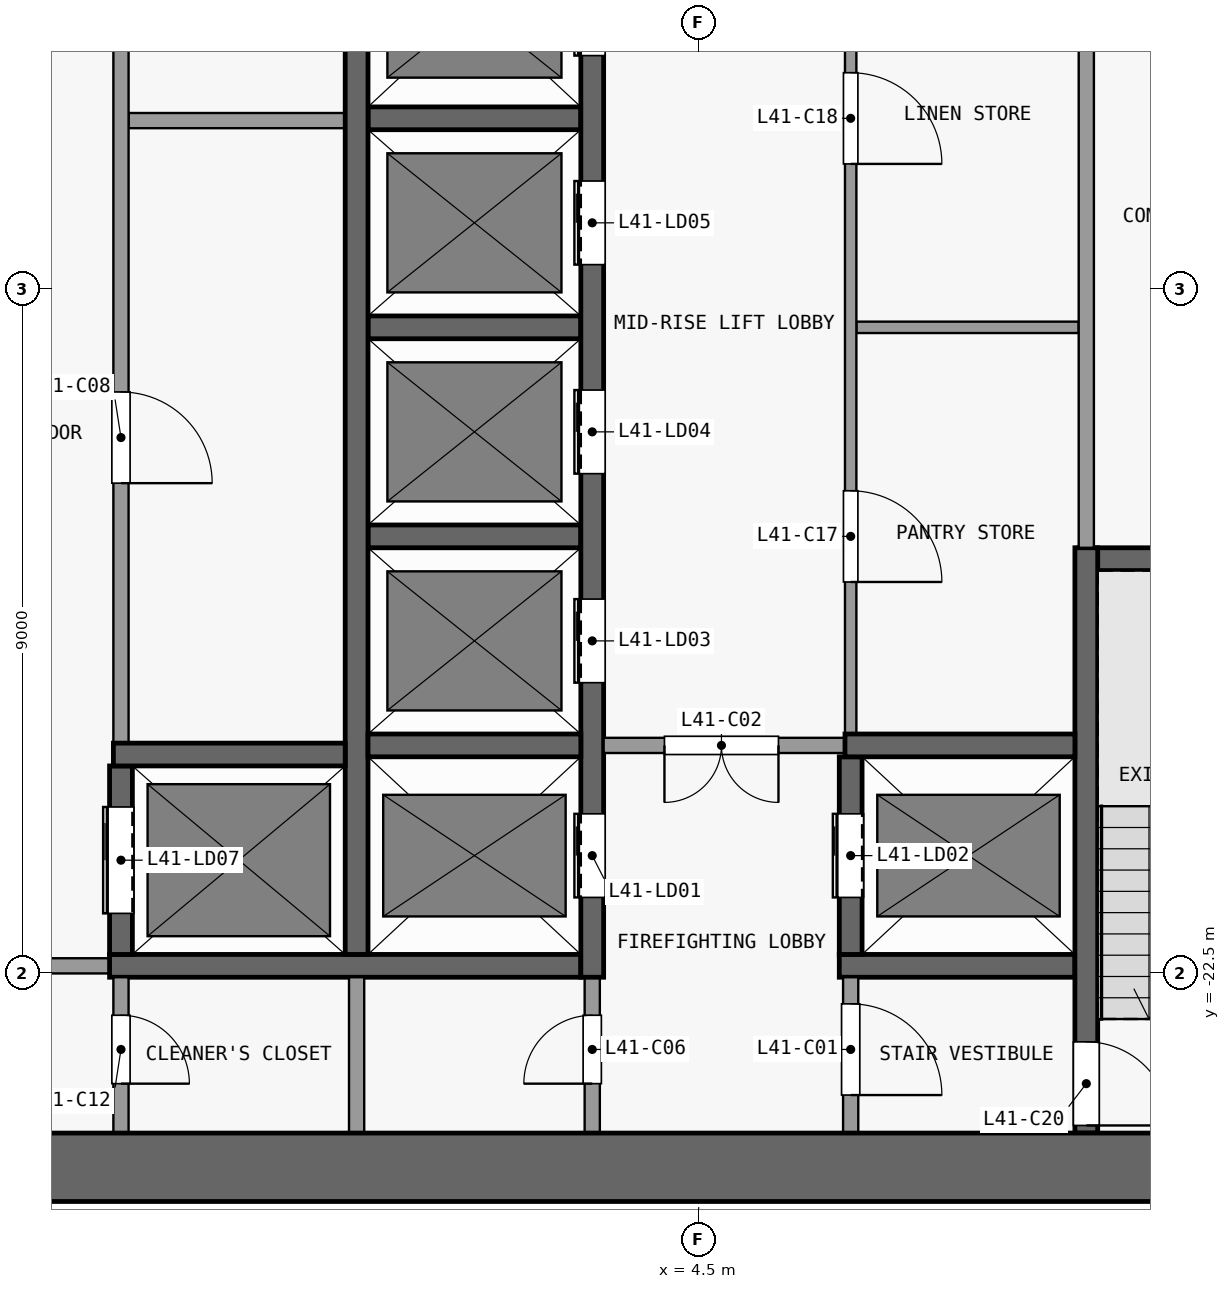
"""IFC4 building model, lengths in metres.
Left out: names, types, materials, properties, quantities, classifications, styles, units other than length and angle.
Written with IfcOpenShell. Run it as: python <this file> out.ifc"""

import sys

from ifc_helpers import new_model, si_unit, direction, frame, frame_2d, origin, place, context, subcontext, project, spatial, rectangle, extrude, element, fill, save


model = new_model("IFC4")
c1 = context("Model", 3, precision=1e-05, world=origin(), true_north=direction((0.0, 1.0)))
c2 = subcontext(c1, "Body", "Model", "MODEL_VIEW")
j1 = project(units=[si_unit("LENGTHUNIT", "METRE"), si_unit("PLANEANGLEUNIT", "RADIAN")], contexts=[c1])
p1 = place(None, origin())
s1 = spatial("IfcSite", under=j1, at=p1, CompositionType="ELEMENT")
p2 = place(p1, origin())
s2 = spatial("IfcBuilding", under=s1, at=p2, CompositionType="ELEMENT")
p3 = place(p2, frame((0.0, 0.0, 167.3)))
s3 = spatial("IfcBuildingStorey", under=s2, at=p3, CompositionType="ELEMENT", Elevation=167.3)
p4 = place(p3, frame((-13.3, -25.05, 0.0), z_axis=(0.0, 0.0, 1.0), x_axis=(1.0, 0.0, 0.0)))
e1 = element("IfcWall", 1, at=p4, inside=s3, PredefinedType="SHEAR", context=c2, shape_type="SweptSolid", body=[
    extrude(rectangle(XDim=26.6, YDim=0.9, at=frame_2d((13.3, 0.0))), origin(), (0.0, 0.0, 1.0), 3.3),
])
p5 = place(p3, frame((-3.25, -22.4, 0.0), z_axis=(0.0, 0.0, 1.0), x_axis=(-1.0, 0.0, 0.0)))
e2 = element("IfcWall", 2, at=p5, inside=s3, PredefinedType="PARTITIONING", context=c2, shape_type="SweptSolid", body=[
    extrude(rectangle(XDim=6.2, YDim=0.2, at=frame_2d((3.1, 0.0))), origin(), (0.0, 0.0, 1.0), 3.3),
])
p6 = place(p5, frame((0.8, 0.0, 0.0)))
e3 = element("IfcOpeningElement", 3, at=p6, cuts=e2, PredefinedType="OPENING", context=c2, shape_type="SweptSolid", body=[
    extrude(rectangle(XDim=1.5, YDim=2.1, at=frame_2d((0.75, 1.05))), frame((0.0, 0.11, 0.0), z_axis=(0.0, -1.0, 0.0), x_axis=(1.0, 0.0, 0.0)), (0.0, 0.0, 1.0), 0.22),
])
p7 = place(p3, frame((-3.25, -22.4, 0.0), z_axis=(0.0, 0.0, 1.0), x_axis=(1.0, 0.0, 0.0)))
e4 = element("IfcWall", 4, at=p7, inside=s3, PredefinedType="SHEAR", context=c2, shape_type="SweptSolid", body=[
    extrude(rectangle(XDim=6.2, YDim=0.3, at=frame_2d((3.1, 0.0))), origin(), (0.0, 0.0, 1.0), 3.3),
])
p8 = place(p3, frame((6.35, -22.4, 0.0), z_axis=(0.0, 0.0, 1.0), x_axis=(1.0, 0.0, 0.0)))
e5 = element("IfcWall", 5, at=p8, inside=s3, PredefinedType="SHEAR", context=c2, shape_type="SweptSolid", body=[
    extrude(rectangle(XDim=3.1, YDim=0.3, at=frame_2d((1.55, 0.0))), origin(), (0.0, 0.0, 1.0), 3.3),
])
p9 = place(p3, frame((-3.2, -19.62, 0.0), z_axis=(0.0, 0.0, 1.0), x_axis=(1.0, 0.0, 0.0)))
e6 = element("IfcWall", 6, at=p9, inside=s3, PredefinedType="SHEAR", context=c2, shape_type="SweptSolid", body=[
    extrude(rectangle(XDim=3.05, YDim=0.3, at=frame_2d((1.525, 0.0))), origin(), (0.0, 0.0, 1.0), 3.3),
])
p10 = place(p3, frame((0.15, -19.5, 0.0), z_axis=(0.0, 0.0, 1.0), x_axis=(1.0, 0.0, 0.0)))
e7 = element("IfcWall", 7, at=p10, inside=s3, PredefinedType="SHEAR", context=c2, shape_type="SweptSolid", body=[
    extrude(rectangle(XDim=2.8, YDim=0.3, at=frame_2d((1.4, 0.0))), origin(), (0.0, 0.0, 1.0), 3.3),
])
p11 = place(p3, frame((6.575, -19.5, 0.0), z_axis=(0.0, 0.0, 1.0), x_axis=(-1.0, 0.0, 0.0)))
e8 = element("IfcWall", 8, at=p11, inside=s3, PredefinedType="PARTITIONING", context=c2, shape_type="SweptSolid", body=[
    extrude(rectangle(XDim=3.325, YDim=0.2, at=frame_2d((1.663, 0.0))), origin(), (0.0, 0.0, 1.0), 3.3),
])
p12 = place(p11, frame((1.025, 0.0, 0.0)))
e9 = element("IfcOpeningElement", 9, at=p12, cuts=e8, PredefinedType="OPENING", context=c2, shape_type="SweptSolid", body=[
    extrude(rectangle(XDim=1.5, YDim=2.1, at=frame_2d((0.75, 1.05))), frame((0.0, 0.11, 0.0), z_axis=(0.0, -1.0, 0.0), x_axis=(1.0, 0.0, 0.0)), (0.0, 0.0, 1.0), 0.22),
])
p13 = place(p3, frame((6.425, -19.5, 0.0), z_axis=(0.0, 0.0, 1.0), x_axis=(1.0, 0.0, 0.0)))
e10 = element("IfcWall", 10, at=p13, inside=s3, PredefinedType="SHEAR", context=c2, shape_type="SweptSolid", body=[
    extrude(rectangle(XDim=3.025, YDim=0.3, at=frame_2d((1.512, 0.0))), origin(), (0.0, 0.0, 1.0), 3.3),
])
p14 = place(p3, frame((9.5, -17.05, 0.0), z_axis=(0.0, 0.0, 1.0), x_axis=(1.0, 0.0, 0.0)))
e11 = element("IfcWall", 11, at=p14, inside=s3, PredefinedType="SHEAR", context=c2, shape_type="SweptSolid", body=[
    extrude(rectangle(XDim=3.1, YDim=0.3, at=frame_2d((1.55, 0.0))), origin(), (0.0, 0.0, 1.0), 3.3),
])
for number, where, z_axis, x_axis in (
    (12, (0.15, -16.75, 0.0), (0.0, 0.0, 1.0), (1.0, 0.0, 0.0)),
    (13, (0.15, -14.0, 0.0), (0.0, 0.0, 1.0), (1.0, 0.0, 0.0)),
):
    element("IfcWall", number, at=place(p3, frame(where, z_axis=z_axis, x_axis=x_axis)), inside=s3, PredefinedType="SHEAR", context=c2, shape_type="SweptSolid", body=[
        extrude(rectangle(XDim=2.8, YDim=0.3, at=frame_2d((1.4, 0.0))), origin(), (0.0, 0.0, 1.0), 3.3),
    ])
p15 = place(p3, frame((6.575, -14.0, 0.0), z_axis=(0.0, 0.0, 1.0), x_axis=(1.0, 0.0, 0.0)))
e14 = element("IfcWall", 14, at=p15, inside=s3, PredefinedType="PARTITIONING", context=c2, shape_type="SweptSolid", body=[
    extrude(rectangle(XDim=2.925, YDim=0.15, at=frame_2d((1.462, 0.0))), origin(), (0.0, 0.0, 1.0), 3.3),
])
p16 = place(p3, frame((-3.0, -11.28, 0.0), z_axis=(0.0, 0.0, 1.0), x_axis=(1.0, 0.0, 0.0)))
e15 = element("IfcWall", 15, at=p16, inside=s3, PredefinedType="PARTITIONING", context=c2, shape_type="SweptSolid", body=[
    extrude(rectangle(XDim=2.85, YDim=0.2, at=frame_2d((1.425, 0.0))), origin(), (0.0, 0.0, 1.0), 3.3),
])
p17 = place(p3, frame((0.15, -11.25, 0.0), z_axis=(0.0, 0.0, 1.0), x_axis=(1.0, 0.0, 0.0)))
e16 = element("IfcWall", 16, at=p17, inside=s3, PredefinedType="SHEAR", context=c2, shape_type="SweptSolid", body=[
    extrude(rectangle(XDim=2.8, YDim=0.3, at=frame_2d((1.4, 0.0))), origin(), (0.0, 0.0, 1.0), 3.3),
])
p18 = place(p3, frame((-3.1, -22.55, 0.0), z_axis=(0.0, 0.0, 1.0), x_axis=(0.0, -1.0, 0.0)))
e17 = element("IfcWall", 17, at=p18, inside=s3, PredefinedType="PARTITIONING", context=c2, shape_type="SweptSolid", body=[
    extrude(rectangle(XDim=2.05, YDim=0.2, at=frame_2d((1.025, 0.0))), origin(), (0.0, 0.0, 1.0), 3.3),
])
p19 = place(p18, frame((0.5, 0.0, 0.0)))
e18 = element("IfcOpeningElement", 18, at=p19, cuts=e17, PredefinedType="OPENING", context=c2, shape_type="SweptSolid", body=[
    extrude(rectangle(XDim=0.9, YDim=2.1, at=frame_2d((0.45, 1.05))), frame((0.0, 0.11, 0.0), z_axis=(0.0, -1.0, 0.0), x_axis=(1.0, 0.0, 0.0)), (0.0, 0.0, 1.0), 0.22),
])
p20 = place(p3, frame((-3.1, -22.25, 0.0), z_axis=(0.0, 0.0, 1.0), x_axis=(0.0, 1.0, 0.0)))
e19 = element("IfcWall", 19, at=p20, inside=s3, PredefinedType="SHEAR", context=c2, shape_type="SweptSolid", body=[
    extrude(rectangle(XDim=2.48, YDim=0.3, at=frame_2d((1.24, 0.0))), origin(), (0.0, 0.0, 1.0), 3.3),
])
p21 = place(p20, frame((0.54, 0.0, 0.0)))
e20 = element("IfcOpeningElement", 20, at=p21, cuts=e19, PredefinedType="OPENING", context=c2, shape_type="SweptSolid", body=[
    extrude(rectangle(XDim=1.4, YDim=2.1, at=frame_2d((0.7, 1.05))), frame((0.0, 0.16, 0.0), z_axis=(0.0, -1.0, 0.0), x_axis=(1.0, 0.0, 0.0)), (0.0, 0.0, 1.0), 0.32),
])
p22 = place(p3, frame((-3.1, -8.5, 0.0), z_axis=(0.0, 0.0, 1.0), x_axis=(0.0, -1.0, 0.0)))
e21 = element("IfcWall", 21, at=p22, inside=s3, PredefinedType="PARTITIONING", context=c2, shape_type="SweptSolid", body=[
    extrude(rectangle(XDim=10.97, YDim=0.2, at=frame_2d((5.485, 0.0))), origin(), (0.0, 0.0, 1.0), 3.3),
])
p23 = place(p22, frame((6.35, 0.0, 0.0)))
e22 = element("IfcOpeningElement", 22, at=p23, cuts=e21, PredefinedType="OPENING", context=c2, shape_type="SweptSolid", body=[
    extrude(rectangle(XDim=1.2, YDim=2.1, at=frame_2d((0.6, 1.05))), frame((0.0, 0.11, 0.0), z_axis=(0.0, -1.0, 0.0), x_axis=(1.0, 0.0, 0.0)), (0.0, 0.0, 1.0), 0.22),
])
p24 = place(p22, frame((0.94, 0.0, 0.0)))
e23 = element("IfcOpeningElement", 23, at=p24, cuts=e21, PredefinedType="OPENING", context=c2, shape_type="SweptSolid", body=[
    extrude(rectangle(XDim=0.9, YDim=2.1, at=frame_2d((0.45, 1.05))), frame((0.0, 0.11, 0.0), z_axis=(0.0, -1.0, 0.0), x_axis=(1.0, 0.0, 0.0)), (0.0, 0.0, 1.0), 0.22),
])
p25 = place(p3, frame((0.0, -24.6, 0.0), z_axis=(0.0, 0.0, 1.0), x_axis=(0.0, 1.0, 0.0)))
e24 = element("IfcWall", 24, at=p25, inside=s3, PredefinedType="PARTITIONING", context=c2, shape_type="SweptSolid", body=[
    extrude(rectangle(XDim=2.05, YDim=0.2, at=frame_2d((1.025, 0.0))), origin(), (0.0, 0.0, 1.0), 3.3),
])
p26 = place(p3, frame((0.0, -22.25, 0.0), z_axis=(0.0, 0.0, 1.0), x_axis=(0.0, 1.0, 0.0)))
e25 = element("IfcWall", 25, at=p26, inside=s3, PredefinedType="SHEAR", context=c2, shape_type="SweptSolid", body=[
    extrude(rectangle(XDim=13.75, YDim=0.3, at=frame_2d((6.875, 0.0))), origin(), (0.0, 0.0, 1.0), 3.3),
])
p27 = place(p3, frame((3.1, -24.6, 0.0), z_axis=(0.0, 0.0, 1.0), x_axis=(0.0, 1.0, 0.0)))
e26 = element("IfcWall", 26, at=p27, inside=s3, PredefinedType="PARTITIONING", context=c2, shape_type="SweptSolid", body=[
    extrude(rectangle(XDim=2.05, YDim=0.2, at=frame_2d((1.025, 0.0))), origin(), (0.0, 0.0, 1.0), 3.3),
])
p28 = place(p27, frame((0.65, 0.0, 0.0)))
e27 = element("IfcOpeningElement", 27, at=p28, cuts=e26, PredefinedType="OPENING", context=c2, shape_type="SweptSolid", body=[
    extrude(rectangle(XDim=0.9, YDim=2.1, at=frame_2d((0.45, 1.05))), frame((0.0, 0.11, 0.0), z_axis=(0.0, -1.0, 0.0), x_axis=(1.0, 0.0, 0.0)), (0.0, 0.0, 1.0), 0.22),
])
p29 = place(p3, frame((3.1, -22.55, 0.0), z_axis=(0.0, 0.0, 1.0), x_axis=(0.0, 1.0, 0.0)))
e28 = element("IfcWall", 28, at=p29, inside=s3, PredefinedType="SHEAR", context=c2, shape_type="SweptSolid", body=[
    extrude(rectangle(XDim=14.05, YDim=0.3, at=frame_2d((7.025, 0.0))), origin(), (0.0, 0.0, 1.0), 3.3),
])
p30 = place(p29, frame((1.05, 0.0, 0.0)))
e29 = element("IfcOpeningElement", 29, at=p30, cuts=e28, PredefinedType="OPENING", context=c2, shape_type="SweptSolid", body=[
    extrude(rectangle(XDim=1.1, YDim=2.1, at=frame_2d((0.55, 1.05))), frame((0.0, 0.16, 0.0), z_axis=(0.0, -1.0, 0.0), x_axis=(1.0, 0.0, 0.0)), (0.0, 0.0, 1.0), 0.32),
])
p31 = place(p29, frame((3.875, 0.0, 0.0)))
e30 = element("IfcOpeningElement", 30, at=p31, cuts=e28, PredefinedType="OPENING", context=c2, shape_type="SweptSolid", body=[
    extrude(rectangle(XDim=1.1, YDim=2.1, at=frame_2d((0.55, 1.05))), frame((0.0, 0.16, 0.0), z_axis=(0.0, -1.0, 0.0), x_axis=(1.0, 0.0, 0.0)), (0.0, 0.0, 1.0), 0.32),
])
p32 = place(p29, frame((6.625, 0.0, 0.0)))
e31 = element("IfcOpeningElement", 31, at=p32, cuts=e28, PredefinedType="OPENING", context=c2, shape_type="SweptSolid", body=[
    extrude(rectangle(XDim=1.1, YDim=2.1, at=frame_2d((0.55, 1.05))), frame((0.0, 0.16, 0.0), z_axis=(0.0, -1.0, 0.0), x_axis=(1.0, 0.0, 0.0)), (0.0, 0.0, 1.0), 0.32),
])
p33 = place(p29, frame((9.375, 0.0, 0.0)))
e32 = element("IfcOpeningElement", 32, at=p33, cuts=e28, PredefinedType="OPENING", context=c2, shape_type="SweptSolid", body=[
    extrude(rectangle(XDim=1.1, YDim=2.1, at=frame_2d((0.55, 1.05))), frame((0.0, 0.16, 0.0), z_axis=(0.0, -1.0, 0.0), x_axis=(1.0, 0.0, 0.0)), (0.0, 0.0, 1.0), 0.32),
])
p34 = place(p29, frame((12.125, 0.0, 0.0)))
e33 = element("IfcOpeningElement", 33, at=p34, cuts=e28, PredefinedType="OPENING", context=c2, shape_type="SweptSolid", body=[
    extrude(rectangle(XDim=1.1, YDim=2.1, at=frame_2d((0.55, 1.05))), frame((0.0, 0.16, 0.0), z_axis=(0.0, -1.0, 0.0), x_axis=(1.0, 0.0, 0.0)), (0.0, 0.0, 1.0), 0.32),
])
p35 = place(p3, frame((6.5, -22.55, 0.0), z_axis=(0.0, 0.0, 1.0), x_axis=(0.0, -1.0, 0.0)))
e34 = element("IfcWall", 34, at=p35, inside=s3, PredefinedType="PARTITIONING", context=c2, shape_type="SweptSolid", body=[
    extrude(rectangle(XDim=2.05, YDim=0.2, at=frame_2d((1.025, 0.0))), origin(), (0.0, 0.0, 1.0), 3.3),
])
p36 = place(p35, frame((0.35, 0.0, 0.0)))
e35 = element("IfcOpeningElement", 35, at=p36, cuts=e34, PredefinedType="OPENING", context=c2, shape_type="SweptSolid", body=[
    extrude(rectangle(XDim=1.2, YDim=2.1, at=frame_2d((0.6, 1.05))), frame((0.0, 0.11, 0.0), z_axis=(0.0, -1.0, 0.0), x_axis=(1.0, 0.0, 0.0)), (0.0, 0.0, 1.0), 0.22),
])
p37 = place(p3, frame((6.5, -22.25, 0.0), z_axis=(0.0, 0.0, 1.0), x_axis=(0.0, 1.0, 0.0)))
e36 = element("IfcWall", 36, at=p37, inside=s3, PredefinedType="SHEAR", context=c2, shape_type="SweptSolid", body=[
    extrude(rectangle(XDim=2.6, YDim=0.3, at=frame_2d((1.3, 0.0))), origin(), (0.0, 0.0, 1.0), 3.3),
])
p38 = place(p37, frame((0.75, 0.0, 0.0)))
e37 = element("IfcOpeningElement", 37, at=p38, cuts=e36, PredefinedType="OPENING", context=c2, shape_type="SweptSolid", body=[
    extrude(rectangle(XDim=1.1, YDim=2.1, at=frame_2d((0.55, 1.05))), frame((0.0, 0.16, 0.0), z_axis=(0.0, -1.0, 0.0), x_axis=(1.0, 0.0, 0.0)), (0.0, 0.0, 1.0), 0.32),
])
p39 = place(p3, frame((6.5, -8.5, 0.0), z_axis=(0.0, 0.0, 1.0), x_axis=(0.0, -1.0, 0.0)))
e38 = element("IfcWall", 38, at=p39, inside=s3, PredefinedType="PARTITIONING", context=c2, shape_type="SweptSolid", body=[
    extrude(rectangle(XDim=10.85, YDim=0.15, at=frame_2d((5.425, 0.0))), origin(), (0.0, 0.0, 1.0), 3.3),
])
p40 = place(p39, frame((7.65, 0.0, 0.0)))
e39 = element("IfcOpeningElement", 39, at=p40, cuts=e38, PredefinedType="OPENING", context=c2, shape_type="SweptSolid", body=[
    extrude(rectangle(XDim=1.2, YDim=2.1, at=frame_2d((0.6, 1.05))), frame((0.0, 0.085, 0.0), z_axis=(0.0, -1.0, 0.0), x_axis=(1.0, 0.0, 0.0)), (0.0, 0.0, 1.0), 0.17),
])
p41 = place(p39, frame((2.15, 0.0, 0.0)))
e40 = element("IfcOpeningElement", 40, at=p41, cuts=e38, PredefinedType="OPENING", context=c2, shape_type="SweptSolid", body=[
    extrude(rectangle(XDim=1.2, YDim=2.1, at=frame_2d((0.6, 1.05))), frame((0.0, 0.085, 0.0), z_axis=(0.0, -1.0, 0.0), x_axis=(1.0, 0.0, 0.0)), (0.0, 0.0, 1.0), 0.17),
])
p42 = place(p3, frame((9.6, -16.9, 0.0), z_axis=(0.0, 0.0, 1.0), x_axis=(0.0, -1.0, 0.0)))
e41 = element("IfcWall", 41, at=p42, inside=s3, PredefinedType="SHEAR", context=c2, shape_type="SweptSolid", body=[
    extrude(rectangle(XDim=7.7, YDim=0.3, at=frame_2d((3.85, 0.0))), origin(), (0.0, 0.0, 1.0), 3.3),
])
p43 = place(p42, frame((6.5, 0.0, 0.0)))
e42 = element("IfcOpeningElement", 42, at=p43, cuts=e41, PredefinedType="OPENING", context=c2, shape_type="SweptSolid", body=[
    extrude(rectangle(XDim=1.1, YDim=2.1, at=frame_2d((0.55, 1.05))), frame((0.0, 0.16, 0.0), z_axis=(0.0, -1.0, 0.0), x_axis=(1.0, 0.0, 0.0)), (0.0, 0.0, 1.0), 0.32),
])
p44 = place(p3, frame((9.6, -16.9, 0.0), z_axis=(0.0, 0.0, 1.0), x_axis=(0.0, 1.0, 0.0)))
e43 = element("IfcWall", 43, at=p44, inside=s3, PredefinedType="PARTITIONING", context=c2, shape_type="SweptSolid", body=[
    extrude(rectangle(XDim=8.4, YDim=0.2, at=frame_2d((4.2, 0.0))), origin(), (0.0, 0.0, 1.0), 3.3),
])
p45 = place(p30, origin())
e44 = element("IfcDoor", 44, at=p45, inside=s3, OperationType="DOUBLE_DOOR_SLIDING", PredefinedType="DOOR", context=c2, shape_type="SweptSolid", body=[
    extrude(rectangle(XDim=1.1, YDim=2.1, at=frame_2d((0.55, 1.05))), frame((0.0, 0.025, 0.0), z_axis=(0.0, -1.0, 0.0), x_axis=(1.0, 0.0, 0.0)), (0.0, 0.0, 1.0), 0.05),
])
fill(e29, e44)
p46 = place(p38, origin())
e45 = element("IfcDoor", 45, at=p46, inside=s3, OperationType="DOUBLE_DOOR_SLIDING", PredefinedType="DOOR", context=c2, shape_type="SweptSolid", body=[
    extrude(rectangle(XDim=1.1, YDim=2.1, at=frame_2d((0.55, 1.05))), frame((0.0, 0.025, 0.0), z_axis=(0.0, -1.0, 0.0), x_axis=(1.0, 0.0, 0.0)), (0.0, 0.0, 1.0), 0.05),
])
fill(e37, e45)
p47 = place(p31, origin())
e46 = element("IfcDoor", 46, at=p47, inside=s3, OperationType="DOUBLE_DOOR_SLIDING", PredefinedType="DOOR", context=c2, shape_type="SweptSolid", body=[
    extrude(rectangle(XDim=1.1, YDim=2.1, at=frame_2d((0.55, 1.05))), frame((0.0, 0.025, 0.0), z_axis=(0.0, -1.0, 0.0), x_axis=(1.0, 0.0, 0.0)), (0.0, 0.0, 1.0), 0.05),
])
fill(e30, e46)
p48 = place(p32, origin())
e47 = element("IfcDoor", 47, at=p48, inside=s3, OperationType="DOUBLE_DOOR_SLIDING", PredefinedType="DOOR", context=c2, shape_type="SweptSolid", body=[
    extrude(rectangle(XDim=1.1, YDim=2.1, at=frame_2d((0.55, 1.05))), frame((0.0, 0.025, 0.0), z_axis=(0.0, -1.0, 0.0), x_axis=(1.0, 0.0, 0.0)), (0.0, 0.0, 1.0), 0.05),
])
fill(e31, e47)
p49 = place(p33, origin())
e48 = element("IfcDoor", 48, at=p49, inside=s3, OperationType="DOUBLE_DOOR_SLIDING", PredefinedType="DOOR", context=c2, shape_type="SweptSolid", body=[
    extrude(rectangle(XDim=1.1, YDim=2.1, at=frame_2d((0.55, 1.05))), frame((0.0, 0.025, 0.0), z_axis=(0.0, -1.0, 0.0), x_axis=(1.0, 0.0, 0.0)), (0.0, 0.0, 1.0), 0.05),
])
fill(e32, e48)
p50 = place(p34, origin())
e49 = element("IfcDoor", 49, at=p50, inside=s3, OperationType="DOUBLE_DOOR_SLIDING", PredefinedType="DOOR", context=c2, shape_type="SweptSolid", body=[
    extrude(rectangle(XDim=1.1, YDim=2.1, at=frame_2d((0.55, 1.05))), frame((0.0, 0.025, 0.0), z_axis=(0.0, -1.0, 0.0), x_axis=(1.0, 0.0, 0.0)), (0.0, 0.0, 1.0), 0.05),
])
fill(e33, e49)
p51 = place(p21, origin())
e50 = element("IfcDoor", 50, at=p51, inside=s3, OperationType="DOUBLE_DOOR_SLIDING", PredefinedType="DOOR", context=c2, shape_type="SweptSolid", body=[
    extrude(rectangle(XDim=1.4, YDim=2.1, at=frame_2d((0.7, 1.05))), frame((0.0, 0.025, 0.0), z_axis=(0.0, -1.0, 0.0), x_axis=(1.0, 0.0, 0.0)), (0.0, 0.0, 1.0), 0.05),
])
fill(e20, e50)
p52 = place(p36, origin())
e51 = element("IfcDoor", 51, at=p52, inside=s3, OperationType="SINGLE_SWING_RIGHT", PredefinedType="DOOR", context=c2, shape_type="SweptSolid", body=[
    extrude(rectangle(XDim=1.2, YDim=2.1, at=frame_2d((0.6, 1.05))), frame((0.0, 0.025, 0.0), z_axis=(0.0, -1.0, 0.0), x_axis=(1.0, 0.0, 0.0)), (0.0, 0.0, 1.0), 0.05),
])
fill(e35, e51)
p53 = place(p12, origin())
e52 = element("IfcDoor", 52, at=p53, inside=s3, OperationType="DOUBLE_DOOR_SINGLE_SWING", PredefinedType="DOOR", context=c2, shape_type="SweptSolid", body=[
    extrude(rectangle(XDim=1.5, YDim=2.1, at=frame_2d((0.75, 1.05))), frame((0.0, 0.025, 0.0), z_axis=(0.0, -1.0, 0.0), x_axis=(1.0, 0.0, 0.0)), (0.0, 0.0, 1.0), 0.05),
])
fill(e9, e52)
p54 = place(p28, origin())
e53 = element("IfcDoor", 53, at=p54, inside=s3, OperationType="SINGLE_SWING_LEFT", PredefinedType="DOOR", context=c2, shape_type="SweptSolid", body=[
    extrude(rectangle(XDim=0.9, YDim=2.1, at=frame_2d((0.45, 1.05))), frame((0.0, 0.025, 0.0), z_axis=(0.0, -1.0, 0.0), x_axis=(1.0, 0.0, 0.0)), (0.0, 0.0, 1.0), 0.05),
])
fill(e27, e53)
p55 = place(p23, origin())
e54 = element("IfcDoor", 54, at=p55, inside=s3, OperationType="SINGLE_SWING_RIGHT", PredefinedType="DOOR", context=c2, shape_type="SweptSolid", body=[
    extrude(rectangle(XDim=1.2, YDim=2.1, at=frame_2d((0.6, 1.05))), frame((0.0, 0.025, 0.0), z_axis=(0.0, -1.0, 0.0), x_axis=(1.0, 0.0, 0.0)), (0.0, 0.0, 1.0), 0.05),
])
fill(e22, e54)
p56 = place(p19, origin())
e55 = element("IfcDoor", 55, at=p56, inside=s3, OperationType="SINGLE_SWING_RIGHT", PredefinedType="DOOR", context=c2, shape_type="SweptSolid", body=[
    extrude(rectangle(XDim=0.9, YDim=2.1, at=frame_2d((0.45, 1.05))), frame((0.0, 0.025, 0.0), z_axis=(0.0, -1.0, 0.0), x_axis=(1.0, 0.0, 0.0)), (0.0, 0.0, 1.0), 0.05),
])
fill(e18, e55)
p57 = place(p40, origin())
e56 = element("IfcDoor", 56, at=p57, inside=s3, OperationType="SINGLE_SWING_RIGHT", PredefinedType="DOOR", context=c2, shape_type="SweptSolid", body=[
    extrude(rectangle(XDim=1.2, YDim=2.1, at=frame_2d((0.6, 1.05))), frame((0.0, 0.025, 0.0), z_axis=(0.0, -1.0, 0.0), x_axis=(1.0, 0.0, 0.0)), (0.0, 0.0, 1.0), 0.05),
])
fill(e39, e56)
p58 = place(p41, origin())
e57 = element("IfcDoor", 57, at=p58, inside=s3, OperationType="SINGLE_SWING_RIGHT", PredefinedType="DOOR", context=c2, shape_type="SweptSolid", body=[
    extrude(rectangle(XDim=1.2, YDim=2.1, at=frame_2d((0.6, 1.05))), frame((0.0, 0.025, 0.0), z_axis=(0.0, -1.0, 0.0), x_axis=(1.0, 0.0, 0.0)), (0.0, 0.0, 1.0), 0.05),
])
fill(e40, e57)
p59 = place(p43, origin())
e58 = element("IfcDoor", 58, at=p59, inside=s3, OperationType="SINGLE_SWING_RIGHT", PredefinedType="DOOR", context=c2, shape_type="SweptSolid", body=[
    extrude(rectangle(XDim=1.1, YDim=2.1, at=frame_2d((0.55, 1.05))), frame((0.0, 0.025, 0.0), z_axis=(0.0, -1.0, 0.0), x_axis=(1.0, 0.0, 0.0)), (0.0, 0.0, 1.0), 0.05),
])
fill(e42, e58)
save(model, sys.argv[1])
